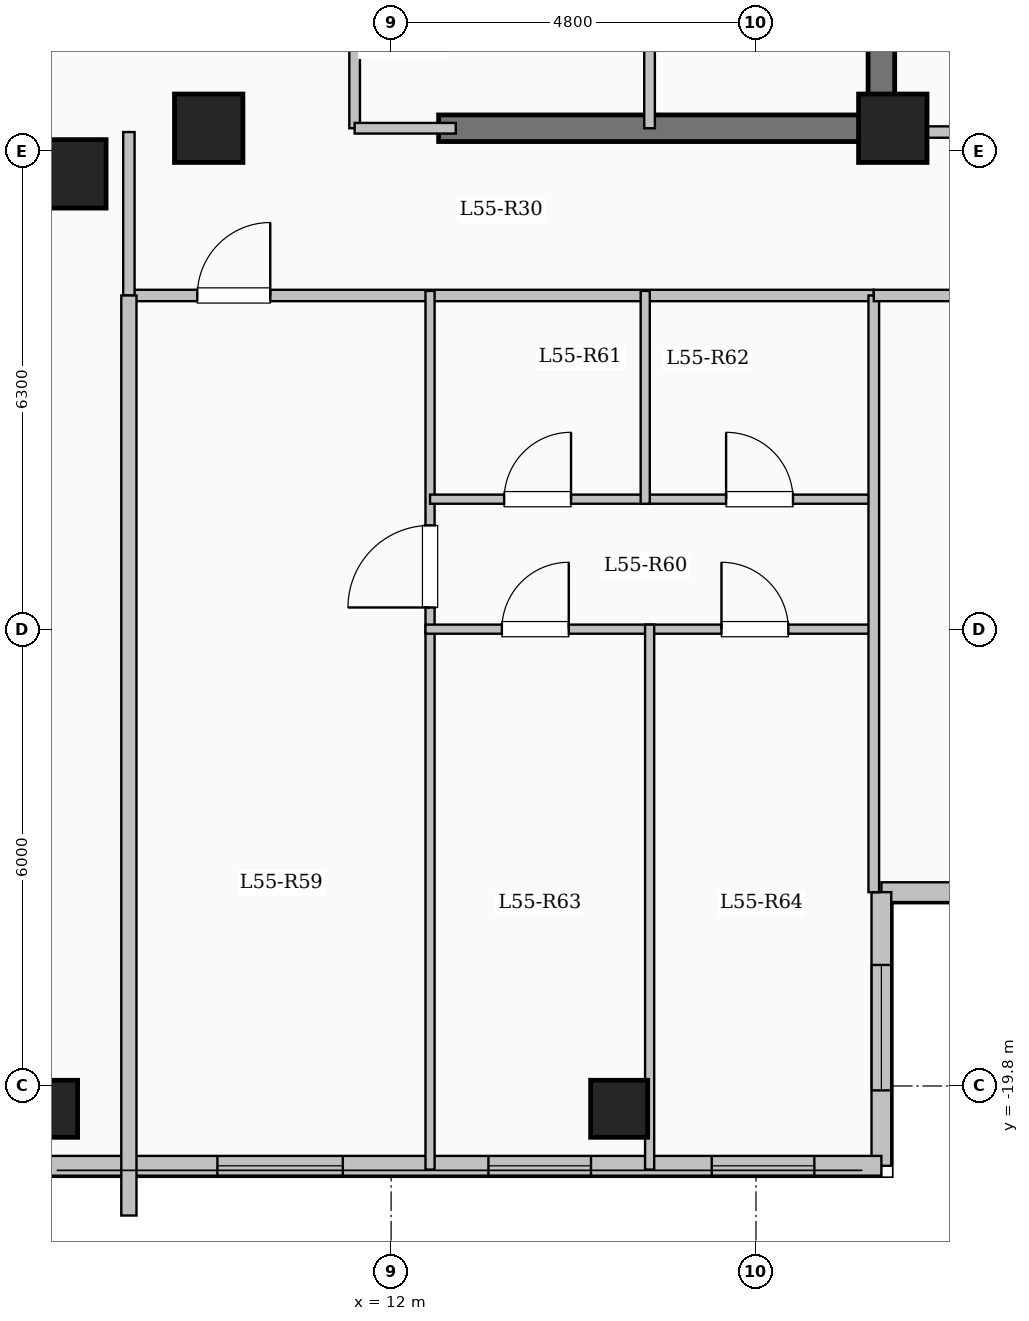
"""IFC4 building model, lengths in metres.
Left out: names, types, materials, properties, quantities, classifications, styles, units other than length and angle.
Written with IfcOpenShell. Run it as: python <this file> out.ifc"""

import sys

from ifc_helpers import new_model, si_unit, direction, frame, frame_2d, origin, origin_2d, place, context, subcontext, project, spatial, rectangle, extrude, element, fill, save


model = new_model("IFC4")
c1 = context("Model", 3, precision=1e-05, world=origin(), true_north=direction((0.0, 1.0)))
c2 = subcontext(c1, "Body", "Model", "MODEL_VIEW")
j1 = project(units=[si_unit("LENGTHUNIT", "METRE"), si_unit("PLANEANGLEUNIT", "RADIAN")], contexts=[c1])
p1 = place(None, origin())
s1 = spatial("IfcSite", under=j1, at=p1, CompositionType="ELEMENT")
p2 = place(p1, origin())
s2 = spatial("IfcBuilding", under=s1, at=p2, CompositionType="ELEMENT")
p3 = place(p2, frame((0.0, 0.0, 203.65)))
s3 = spatial("IfcBuildingStorey", under=s2, at=p3, CompositionType="ELEMENT", Elevation=203.65)
for number, where, z_axis, x_axis in (
    (1, (7.8, -7.8, 0.0), (0.0, 0.0, 1.0), (1.0, 0.0, 0.0)),
    (2, (9.6, -7.2, 0.0), (0.0, 0.0, 1.0), (1.0, 0.0, 0.0)),
    (3, (18.6, -7.2, 0.0), (0.0, 0.0, 1.0), (1.0, 0.0, 0.0)),
):
    element("IfcColumn", number, at=place(p3, frame(where, z_axis=z_axis, x_axis=x_axis)), inside=s3, PredefinedType="COLUMN", context=c2, shape_type="SweptSolid", body=[
        extrude(rectangle(XDim=0.9, YDim=0.9, at=origin_2d()), origin(), (0.0, 0.0, 1.0), 3.35),
    ])
for number, where, z_axis, x_axis in (
    (4, (7.5, -20.1, 0.0), (0.0, 0.0, 1.0), (1.0, 0.0, 0.0)),
    (5, (15.0, -20.1, 0.0), (0.0, 0.0, 1.0), (1.0, 0.0, 0.0)),
):
    element("IfcColumn", number, at=place(p3, frame(where, z_axis=z_axis, x_axis=x_axis)), inside=s3, PredefinedType="COLUMN", context=c2, shape_type="SweptSolid", body=[
        extrude(rectangle(XDim=0.75, YDim=0.75, at=origin_2d()), origin(), (0.0, 0.0, 1.0), 3.35),
    ])
p4 = place(p3, frame((23.55, -17.25, 0.0), z_axis=(0.0, 0.0, 1.0), x_axis=(-1.0, 0.0, 0.0)))
e6 = element("IfcWall", 6, at=p4, inside=s3, PredefinedType="SOLIDWALL", context=c2, shape_type="SweptSolid", body=[
    extrude(rectangle(XDim=5.1, YDim=0.26, at=frame_2d((2.55, 0.0))), origin(), (0.0, 0.0, 1.0), 3.1),
])
p5 = place(p4, frame((1.475, 0.0, 0.9)))
e7 = element("IfcOpeningElement", 7, at=p5, cuts=e6, PredefinedType="OPENING", context=c2, shape_type="SweptSolid", body=[
    extrude(rectangle(XDim=2.2, YDim=1.75, at=frame_2d((1.1, 0.875))), frame((0.0, 0.14, 0.0), z_axis=(0.0, -1.0, 0.0), x_axis=(1.0, 0.0, 0.0)), (0.0, 0.0, 1.0), 0.28),
])
p6 = place(p3, frame((18.45, -17.25, 0.0), z_axis=(0.0, 0.0, 1.0), x_axis=(0.0, -1.0, 0.0)))
e8 = element("IfcWall", 8, at=p6, inside=s3, PredefinedType="SOLIDWALL", context=c2, shape_type="SweptSolid", body=[
    extrude(rectangle(XDim=3.6, YDim=0.26, at=frame_2d((1.8, 0.0))), origin(), (0.0, 0.0, 1.0), 3.1),
])
p7 = place(p6, frame((0.958, 0.0, 0.9)))
e9 = element("IfcOpeningElement", 9, at=p7, cuts=e8, PredefinedType="OPENING", context=c2, shape_type="SweptSolid", body=[
    extrude(rectangle(XDim=1.65, YDim=1.6, at=frame_2d((0.825, 0.8))), frame((0.0, 0.14, 0.0), z_axis=(0.0, -1.0, 0.0), x_axis=(1.0, 0.0, 0.0)), (0.0, 0.0, 1.0), 0.28),
])
p8 = place(p3, frame((18.45, -20.85, 0.0), z_axis=(0.0, 0.0, 1.0), x_axis=(-1.0, 0.0, 0.0)))
e10 = element("IfcWall", 10, at=p8, inside=s3, PredefinedType="SOLIDWALL", context=c2, shape_type="SweptSolid", body=[
    extrude(rectangle(XDim=11.1, YDim=0.26, at=frame_2d((5.55, 0.0))), origin(), (0.0, 0.0, 1.0), 3.1),
])
p9 = place(p8, frame((0.882, 0.0, 0.95)))
e11 = element("IfcOpeningElement", 11, at=p9, cuts=e10, PredefinedType="OPENING", context=c2, shape_type="SweptSolid", body=[
    extrude(rectangle(XDim=1.35, YDim=1.55, at=frame_2d((0.675, 0.775))), frame((0.0, 0.14, 0.0), z_axis=(0.0, -1.0, 0.0), x_axis=(1.0, 0.0, 0.0)), (0.0, 0.0, 1.0), 0.28),
])
p10 = place(p8, frame((3.82, 0.0, 0.95)))
e12 = element("IfcOpeningElement", 12, at=p10, cuts=e10, PredefinedType="OPENING", context=c2, shape_type="SweptSolid", body=[
    extrude(rectangle(XDim=1.35, YDim=1.55, at=frame_2d((0.675, 0.775))), frame((0.0, 0.14, 0.0), z_axis=(0.0, -1.0, 0.0), x_axis=(1.0, 0.0, 0.0)), (0.0, 0.0, 1.0), 0.28),
])
p11 = place(p8, frame((7.086, 0.0, 0.9)))
e13 = element("IfcOpeningElement", 13, at=p11, cuts=e10, PredefinedType="OPENING", context=c2, shape_type="SweptSolid", body=[
    extrude(rectangle(XDim=1.65, YDim=1.6, at=frame_2d((0.825, 0.8))), frame((0.0, 0.14, 0.0), z_axis=(0.0, -1.0, 0.0), x_axis=(1.0, 0.0, 0.0)), (0.0, 0.0, 1.0), 0.28),
])
p12 = place(p3, frame((18.45, -7.375, 0.0), z_axis=(0.0, 0.0, 1.0), x_axis=(0.0, 1.0, 0.0)))
e14 = element("IfcWall", 14, at=p12, inside=s3, PredefinedType="SHEAR", context=c2, shape_type="SweptSolid", body=[
    extrude(rectangle(XDim=14.05, YDim=0.35, at=frame_2d((7.025, 0.0))), origin(), (0.0, 0.0, 1.0), 3.35),
])
p13 = place(p3, frame((12.625, -7.2, 0.0), z_axis=(0.0, 0.0, 1.0), x_axis=(1.0, 0.0, 0.0)))
e15 = element("IfcWall", 15, at=p13, inside=s3, PredefinedType="SHEAR", context=c2, shape_type="SweptSolid", body=[
    extrude(rectangle(XDim=6.0, YDim=0.35, at=frame_2d((3.0, 0.0))), origin(), (0.0, 0.0, 1.0), 3.35),
])
p14 = place(p3, frame((15.4, -7.2, 0.0), z_axis=(0.0, 0.0, 1.0), x_axis=(0.0, 1.0, 0.0)))
e16 = element("IfcWall", 16, at=p14, inside=s3, PredefinedType="PARTITIONING", context=c2, shape_type="SweptSolid", body=[
    extrude(rectangle(XDim=10.45, YDim=0.14, at=frame_2d((5.225, 0.0))), origin(), (0.0, 0.0, 1.0), 3.1),
])
p15 = place(p14, frame((9.25, 0.0, 0.0)))
e17 = element("IfcOpeningElement", 17, at=p15, cuts=e16, PredefinedType="OPENING", context=c2, shape_type="SweptSolid", body=[
    extrude(rectangle(XDim=0.9, YDim=2.08, at=frame_2d((0.45, 1.04))), frame((0.0, 0.08, 0.0), z_axis=(0.0, -1.0, 0.0), x_axis=(1.0, 0.0, 0.0)), (0.0, 0.0, 1.0), 0.16),
])
p16 = place(p3, frame((11.52, -7.2, 0.0), z_axis=(0.0, 0.0, 1.0), x_axis=(0.0, 1.0, 0.0)))
e18 = element("IfcWall", 18, at=p16, inside=s3, PredefinedType="PARTITIONING", context=c2, shape_type="SweptSolid", body=[
    extrude(rectangle(XDim=9.12, YDim=0.14, at=frame_2d((4.56, 0.0))), origin(), (0.0, 0.0, 1.0), 3.1),
])
p17 = place(p16, frame((1.8, 0.0, 0.0)))
e19 = element("IfcOpeningElement", 19, at=p17, cuts=e18, PredefinedType="OPENING", context=c2, shape_type="SweptSolid", body=[
    extrude(rectangle(XDim=0.9, YDim=2.08, at=frame_2d((0.45, 1.04))), frame((0.0, 0.08, 0.0), z_axis=(0.0, -1.0, 0.0), x_axis=(1.0, 0.0, 0.0)), (0.0, 0.0, 1.0), 0.16),
])
p18 = place(p16, frame((6.2, 0.0, 0.0)))
e20 = element("IfcOpeningElement", 20, at=p18, cuts=e18, PredefinedType="OPENING", context=c2, shape_type="SweptSolid", body=[
    extrude(rectangle(XDim=0.9, YDim=2.08, at=frame_2d((0.45, 1.04))), frame((0.0, 0.08, 0.0), z_axis=(0.0, -1.0, 0.0), x_axis=(1.0, 0.0, 0.0)), (0.0, 0.0, 1.0), 0.16),
])
p19 = place(p3, frame((11.52, -7.2, 0.0), z_axis=(0.0, 0.0, 1.0), x_axis=(1.0, 0.0, 0.0)))
e21 = element("IfcWall", 21, at=p19, inside=s3, PredefinedType="PARTITIONING", context=c2, shape_type="SweptSolid", body=[
    extrude(rectangle(XDim=1.33, YDim=0.14, at=frame_2d((0.665, 0.0))), origin(), (0.0, 0.0, 1.0), 2.235),
])
p20 = place(p3, frame((8.55, -9.4, 0.0), z_axis=(0.0, 0.0, 1.0), x_axis=(1.0, 0.0, 0.0)))
e22 = element("IfcWall", 22, at=p20, inside=s3, PredefinedType="PARTITIONING", context=c2, shape_type="SweptSolid", body=[
    extrude(rectangle(XDim=9.8, YDim=0.15, at=frame_2d((4.9, 0.0))), origin(), (0.0, 0.0, 1.0), 3.1),
])
p21 = place(p20, frame((0.9, 0.0, 0.0)))
e23 = element("IfcOpeningElement", 23, at=p21, cuts=e22, PredefinedType="OPENING", context=c2, shape_type="SweptSolid", body=[
    extrude(rectangle(XDim=0.96, YDim=2.15, at=frame_2d((0.48, 1.075))), frame((0.0, 0.085, 0.0), z_axis=(0.0, -1.0, 0.0), x_axis=(1.0, 0.0, 0.0)), (0.0, 0.0, 1.0), 0.17),
])
p22 = place(p3, frame((8.55, -9.4, 0.0), z_axis=(0.0, 0.0, 1.0), x_axis=(0.0, 1.0, 0.0)))
e24 = element("IfcWall", 24, at=p22, inside=s3, PredefinedType="PARTITIONING", context=c2, shape_type="SweptSolid", body=[
    extrude(rectangle(XDim=2.15, YDim=0.15, at=frame_2d((1.075, 0.0))), origin(), (0.0, 0.0, 1.0), 3.1),
])
p23 = place(p3, frame((12.512, -20.9, 0.0), z_axis=(0.0, 0.0, 1.0), x_axis=(0.0, 1.0, 0.0)))
e25 = element("IfcWall", 25, at=p23, inside=s3, PredefinedType="PARTITIONING", context=c2, shape_type="SweptSolid", body=[
    extrude(rectangle(XDim=11.56, YDim=0.12, at=frame_2d((5.78, 0.0))), origin(), (0.0, 0.0, 1.0), 3.1),
])
p24 = place(p23, frame((7.395, 0.0, 0.0)))
e26 = element("IfcOpeningElement", 26, at=p24, cuts=e25, PredefinedType="OPENING", context=c2, shape_type="SweptSolid", body=[
    extrude(rectangle(XDim=1.08, YDim=2.15, at=frame_2d((0.54, 1.075))), frame((0.0, 0.07, 0.0), z_axis=(0.0, -1.0, 0.0), x_axis=(1.0, 0.0, 0.0)), (0.0, 0.0, 1.0), 0.14),
])
p25 = place(p3, frame((12.512, -12.08, 0.0), z_axis=(0.0, 0.0, 1.0), x_axis=(1.0, 0.0, 0.0)))
e27 = element("IfcWall", 27, at=p25, inside=s3, PredefinedType="PARTITIONING", context=c2, shape_type="SweptSolid", body=[
    extrude(rectangle(XDim=2.831, YDim=0.12, at=frame_2d((1.416, 0.0))), origin(), (0.0, 0.0, 1.0), 2.725),
])
p26 = place(p25, frame((0.975, 0.0, 0.0)))
e28 = element("IfcOpeningElement", 28, at=p26, cuts=e27, PredefinedType="OPENING", context=c2, shape_type="SweptSolid", body=[
    extrude(rectangle(XDim=0.88, YDim=2.1, at=frame_2d((0.44, 1.05))), frame((0.0, 0.07, 0.0), z_axis=(0.0, -1.0, 0.0), x_axis=(1.0, 0.0, 0.0)), (0.0, 0.0, 1.0), 0.14),
])
p27 = place(p3, frame((15.343, -12.08, 0.0), z_axis=(0.0, 0.0, 1.0), x_axis=(1.0, 0.0, 0.0)))
e29 = element("IfcWall", 29, at=p27, inside=s3, PredefinedType="PARTITIONING", context=c2, shape_type="SweptSolid", body=[
    extrude(rectangle(XDim=3.007, YDim=0.12, at=frame_2d((1.503, 0.0))), origin(), (0.0, 0.0, 1.0), 3.1),
])
p28 = place(p27, frame((1.064, 0.0, 0.0)))
e30 = element("IfcOpeningElement", 30, at=p28, cuts=e29, PredefinedType="OPENING", context=c2, shape_type="SweptSolid", body=[
    extrude(rectangle(XDim=0.88, YDim=2.1, at=frame_2d((0.44, 1.05))), frame((0.0, 0.07, 0.0), z_axis=(0.0, -1.0, 0.0), x_axis=(1.0, 0.0, 0.0)), (0.0, 0.0, 1.0), 0.14),
])
p29 = place(p3, frame((12.452, -13.79, 0.0), z_axis=(0.0, 0.0, 1.0), x_axis=(1.0, 0.0, 0.0)))
e31 = element("IfcWall", 31, at=p29, inside=s3, PredefinedType="PARTITIONING", context=c2, shape_type="SweptSolid", body=[
    extrude(rectangle(XDim=5.958, YDim=0.12, at=frame_2d((2.979, 0.0))), origin(), (0.0, 0.0, 1.0), 2.725),
])
p30 = place(p29, frame((1.005, 0.0, 0.0)))
e32 = element("IfcOpeningElement", 32, at=p30, cuts=e31, PredefinedType="OPENING", context=c2, shape_type="SweptSolid", body=[
    extrude(rectangle(XDim=0.88, YDim=2.1, at=frame_2d((0.44, 1.05))), frame((0.0, 0.07, 0.0), z_axis=(0.0, -1.0, 0.0), x_axis=(1.0, 0.0, 0.0)), (0.0, 0.0, 1.0), 0.14),
])
p31 = place(p29, frame((3.894, 0.0, 0.0)))
e33 = element("IfcOpeningElement", 33, at=p31, cuts=e31, PredefinedType="OPENING", context=c2, shape_type="SweptSolid", body=[
    extrude(rectangle(XDim=0.88, YDim=2.1, at=frame_2d((0.44, 1.05))), frame((0.0, 0.07, 0.0), z_axis=(0.0, -1.0, 0.0), x_axis=(1.0, 0.0, 0.0)), (0.0, 0.0, 1.0), 0.14),
])
p32 = place(p3, frame((15.343, -12.14, 0.0), z_axis=(0.0, 0.0, 1.0), x_axis=(0.0, 1.0, 0.0)))
e34 = element("IfcWall", 34, at=p32, inside=s3, PredefinedType="PARTITIONING", context=c2, shape_type="SweptSolid", body=[
    extrude(rectangle(XDim=2.8, YDim=0.12, at=frame_2d((1.4, 0.0))), origin(), (0.0, 0.0, 1.0), 3.1),
])
p33 = place(p3, frame((15.401, -20.9, 0.0), z_axis=(0.0, 0.0, 1.0), x_axis=(0.0, 1.0, 0.0)))
e35 = element("IfcWall", 35, at=p33, inside=s3, PredefinedType="PARTITIONING", context=c2, shape_type="SweptSolid", body=[
    extrude(rectangle(XDim=7.17, YDim=0.12, at=frame_2d((3.585, 0.0))), origin(), (0.0, 0.0, 1.0), 3.1),
])
p34 = place(p3, frame((8.55, -21.504, 0.0), z_axis=(0.0, 0.0, 1.0), x_axis=(0.0, 1.0, 0.0)))
e36 = element("IfcWall", 36, at=p34, inside=s3, PredefinedType="SOLIDWALL", context=c2, shape_type="SweptSolid", body=[
    extrude(rectangle(XDim=12.104, YDim=0.2, at=frame_2d((6.052, 0.0))), origin(), (0.0, 0.0, 1.0), 3.1),
])
p35 = place(p3, frame((18.45, -7.25, 0.0), z_axis=(0.0, 0.0, 1.0), x_axis=(1.0, 0.0, 0.0)))
e37 = element("IfcWall", 37, at=p35, inside=s3, PredefinedType="PARTITIONING", context=c2, shape_type="SweptSolid", body=[
    extrude(rectangle(XDim=5.13, YDim=0.15, at=frame_2d((2.565, 0.0))), origin(), (0.0, 0.0, 1.0), 3.1),
])
p36 = place(p35, frame((1.95, 0.0, 0.0)))
e38 = element("IfcOpeningElement", 38, at=p36, cuts=e37, PredefinedType="OPENING", context=c2, shape_type="SweptSolid", body=[
    extrude(rectangle(XDim=0.96, YDim=2.15, at=frame_2d((0.48, 1.075))), frame((0.0, 0.085, 0.0), z_axis=(0.0, -1.0, 0.0), x_axis=(1.0, 0.0, 0.0)), (0.0, 0.0, 1.0), 0.17),
])
p37 = place(p3, frame((18.35, -17.25, 0.0), z_axis=(0.0, 0.0, 1.0), x_axis=(0.0, 1.0, 0.0)))
e39 = element("IfcWall", 39, at=p37, inside=s3, PredefinedType="PARTITIONING", context=c2, shape_type="SweptSolid", body=[
    extrude(rectangle(XDim=7.85, YDim=0.14, at=frame_2d((3.925, 0.0))), origin(), (0.0, 0.0, 1.0), 3.1),
])
p38 = place(p3, frame((18.35, -9.4, 0.0), z_axis=(0.0, 0.0, 1.0), x_axis=(1.0, 0.0, 0.0)))
e40 = element("IfcWall", 40, at=p38, inside=s3, PredefinedType="PARTITIONING", context=c2, shape_type="SweptSolid", body=[
    extrude(rectangle(XDim=5.23, YDim=0.15, at=frame_2d((2.615, 0.0))), origin(), (0.0, 0.0, 1.0), 3.1),
])
p39 = place(p38, frame((2.14, 0.0, 0.0)))
e41 = element("IfcOpeningElement", 41, at=p39, cuts=e40, PredefinedType="OPENING", context=c2, shape_type="SweptSolid", body=[
    extrude(rectangle(XDim=0.95, YDim=2.15, at=frame_2d((0.475, 1.075))), frame((0.0, 0.085, 0.0), z_axis=(0.0, -1.0, 0.0), x_axis=(1.0, 0.0, 0.0)), (0.0, 0.0, 1.0), 0.17),
])
p40 = place(p7, origin())
e42 = element("IfcWindow", 42, at=p40, inside=s3, PartitioningType="SINGLE_PANEL", PredefinedType="WINDOW", context=c2, shape_type="SweptSolid", body=[
    extrude(rectangle(XDim=1.65, YDim=1.6, at=frame_2d((0.825, 0.8))), frame((0.0, 0.03, 0.0), z_axis=(0.0, -1.0, 0.0), x_axis=(1.0, 0.0, 0.0)), (0.0, 0.0, 1.0), 0.06),
])
fill(e9, e42)
p41 = place(p9, origin())
e43 = element("IfcWindow", 43, at=p41, inside=s3, PartitioningType="SINGLE_PANEL", PredefinedType="WINDOW", context=c2, shape_type="SweptSolid", body=[
    extrude(rectangle(XDim=1.35, YDim=1.55, at=frame_2d((0.675, 0.775))), frame((0.0, 0.03, 0.0), z_axis=(0.0, -1.0, 0.0), x_axis=(1.0, 0.0, 0.0)), (0.0, 0.0, 1.0), 0.06),
])
fill(e11, e43)
p42 = place(p10, origin())
e44 = element("IfcWindow", 44, at=p42, inside=s3, PartitioningType="SINGLE_PANEL", PredefinedType="WINDOW", context=c2, shape_type="SweptSolid", body=[
    extrude(rectangle(XDim=1.35, YDim=1.55, at=frame_2d((0.675, 0.775))), frame((0.0, 0.03, 0.0), z_axis=(0.0, -1.0, 0.0), x_axis=(1.0, 0.0, 0.0)), (0.0, 0.0, 1.0), 0.06),
])
fill(e12, e44)
p43 = place(p11, origin())
e45 = element("IfcWindow", 45, at=p43, inside=s3, PartitioningType="SINGLE_PANEL", PredefinedType="WINDOW", context=c2, shape_type="SweptSolid", body=[
    extrude(rectangle(XDim=1.65, YDim=1.6, at=frame_2d((0.825, 0.8))), frame((0.0, 0.03, 0.0), z_axis=(0.0, -1.0, 0.0), x_axis=(1.0, 0.0, 0.0)), (0.0, 0.0, 1.0), 0.06),
])
fill(e13, e45)
p44 = place(p21, origin())
e46 = element("IfcDoor", 46, at=p44, inside=s3, OperationType="SINGLE_SWING_RIGHT", PredefinedType="DOOR", context=c2, shape_type="SweptSolid", body=[
    extrude(rectangle(XDim=0.96, YDim=2.15, at=frame_2d((0.48, 1.075))), frame((0.0, 0.025, 0.0), z_axis=(0.0, -1.0, 0.0), x_axis=(1.0, 0.0, 0.0)), (0.0, 0.0, 1.0), 0.05),
])
fill(e23, e46)
p45 = place(p24, origin())
e47 = element("IfcDoor", 47, at=p45, inside=s3, OperationType="SINGLE_SWING_LEFT", PredefinedType="DOOR", context=c2, shape_type="SweptSolid", body=[
    extrude(rectangle(XDim=1.08, YDim=2.15, at=frame_2d((0.54, 1.075))), frame((0.0, 0.025, 0.0), z_axis=(0.0, -1.0, 0.0), x_axis=(1.0, 0.0, 0.0)), (0.0, 0.0, 1.0), 0.05),
])
fill(e26, e47)
p46 = place(p26, origin())
e48 = element("IfcDoor", 48, at=p46, inside=s3, OperationType="SINGLE_SWING_RIGHT", PredefinedType="DOOR", context=c2, shape_type="SweptSolid", body=[
    extrude(rectangle(XDim=0.88, YDim=2.1, at=frame_2d((0.44, 1.05))), frame((0.0, 0.025, 0.0), z_axis=(0.0, -1.0, 0.0), x_axis=(1.0, 0.0, 0.0)), (0.0, 0.0, 1.0), 0.05),
])
fill(e28, e48)
p47 = place(p28, origin())
e49 = element("IfcDoor", 49, at=p47, inside=s3, OperationType="SINGLE_SWING_LEFT", PredefinedType="DOOR", context=c2, shape_type="SweptSolid", body=[
    extrude(rectangle(XDim=0.88, YDim=2.1, at=frame_2d((0.44, 1.05))), frame((0.0, 0.025, 0.0), z_axis=(0.0, -1.0, 0.0), x_axis=(1.0, 0.0, 0.0)), (0.0, 0.0, 1.0), 0.05),
])
fill(e30, e49)
p48 = place(p30, origin())
e50 = element("IfcDoor", 50, at=p48, inside=s3, OperationType="SINGLE_SWING_RIGHT", PredefinedType="DOOR", context=c2, shape_type="SweptSolid", body=[
    extrude(rectangle(XDim=0.88, YDim=2.1, at=frame_2d((0.44, 1.05))), frame((0.0, 0.025, 0.0), z_axis=(0.0, -1.0, 0.0), x_axis=(1.0, 0.0, 0.0)), (0.0, 0.0, 1.0), 0.05),
])
fill(e32, e50)
p49 = place(p31, origin())
e51 = element("IfcDoor", 51, at=p49, inside=s3, OperationType="SINGLE_SWING_LEFT", PredefinedType="DOOR", context=c2, shape_type="SweptSolid", body=[
    extrude(rectangle(XDim=0.88, YDim=2.1, at=frame_2d((0.44, 1.05))), frame((0.0, 0.025, 0.0), z_axis=(0.0, -1.0, 0.0), x_axis=(1.0, 0.0, 0.0)), (0.0, 0.0, 1.0), 0.05),
])
fill(e33, e51)
save(model, sys.argv[1])
